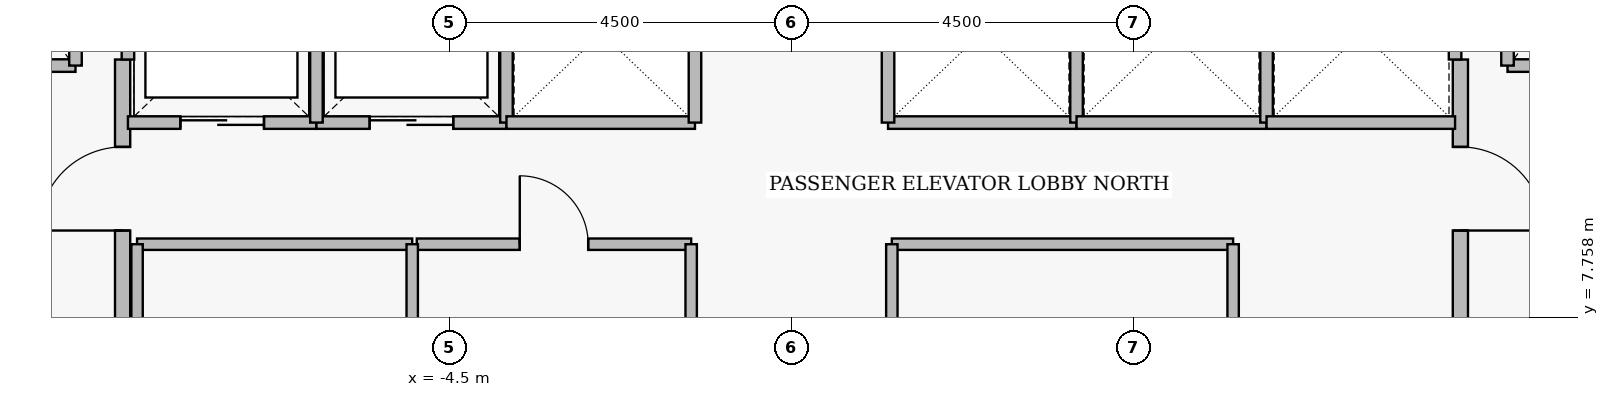
"""IFC4 building model, lengths in metres.
Left out: names, types, materials, properties, quantities, classifications, styles, units other than length and angle.
Written with IfcOpenShell. Run it as: python <this file> out.ifc"""

import sys

from ifc_helpers import new_model, si_unit, direction, frame, frame_2d, origin, place, context, subcontext, project, spatial, rectangle, extrude, element, fill, save


model = new_model("IFC4")
c1 = context("Model", 3, precision=1e-05, world=origin(), true_north=direction((0.0, 1.0)))
c2 = subcontext(c1, "Body", "Model", "MODEL_VIEW")
j1 = project(units=[si_unit("LENGTHUNIT", "METRE"), si_unit("PLANEANGLEUNIT", "RADIAN")], contexts=[c1])
p1 = place(None, origin())
s1 = spatial("IfcSite", under=j1, at=p1, CompositionType="ELEMENT")
p2 = place(p1, origin())
s2 = spatial("IfcBuilding", under=s1, at=p2, CompositionType="ELEMENT")
p3 = place(p2, frame((0.0, 0.0, 139.45)))
s3 = spatial("IfcBuildingStorey", under=s2, at=p3, CompositionType="ELEMENT", Elevation=139.45)
p4 = place(p3, frame((-8.8, 5.05, 0.0), z_axis=(0.0, 0.0, 1.0), x_axis=(0.0, 1.0, 0.0)))
e1 = element("IfcWall", 1, at=p4, inside=s3, PredefinedType="PARTITIONING", context=c2, shape_type="SweptSolid", body=[
    extrude(rectangle(XDim=6.1, YDim=0.2, at=frame_2d((3.05, 0.0))), origin(), (0.0, 0.0, 1.0), 3.43),
])
p5 = place(p4, frame((0.25, 0.0, 0.0)))
e2 = element("IfcOpeningElement", 2, at=p5, cuts=e1, PredefinedType="OPENING", context=c2, shape_type="SweptSolid", body=[
    extrude(rectangle(XDim=1.1, YDim=2.2, at=frame_2d((0.55, 1.1))), frame((0.0, 0.11, 0.0), z_axis=(0.0, -1.0, 0.0), x_axis=(1.0, 0.0, 0.0)), (0.0, 0.0, 1.0), 0.22),
])
p6 = place(p4, frame((3.85, 0.0, 0.0)))
e3 = element("IfcOpeningElement", 3, at=p6, cuts=e1, PredefinedType="OPENING", context=c2, shape_type="SweptSolid", body=[
    extrude(rectangle(XDim=1.1, YDim=2.2, at=frame_2d((0.55, 1.1))), frame((0.0, 0.11, 0.0), z_axis=(0.0, -1.0, 0.0), x_axis=(1.0, 0.0, 0.0)), (0.0, 0.0, 1.0), 0.22),
])
p7 = place(p3, frame((8.8, 11.15, 0.0), z_axis=(0.0, 0.0, 1.0), x_axis=(0.0, -1.0, 0.0)))
e4 = element("IfcWall", 4, at=p7, inside=s3, PredefinedType="PARTITIONING", context=c2, shape_type="SweptSolid", body=[
    extrude(rectangle(XDim=6.1, YDim=0.2, at=frame_2d((3.05, 0.0))), origin(), (0.0, 0.0, 1.0), 3.43),
])
p8 = place(p7, frame((1.15, 0.0, 0.0)))
e5 = element("IfcOpeningElement", 5, at=p8, cuts=e4, PredefinedType="OPENING", context=c2, shape_type="SweptSolid", body=[
    extrude(rectangle(XDim=1.1, YDim=2.2, at=frame_2d((0.55, 1.1))), frame((0.0, 0.11, 0.0), z_axis=(0.0, -1.0, 0.0), x_axis=(1.0, 0.0, 0.0)), (0.0, 0.0, 1.0), 0.22),
])
p9 = place(p7, frame((4.75, 0.0, 0.0)))
e6 = element("IfcOpeningElement", 6, at=p9, cuts=e4, PredefinedType="OPENING", context=c2, shape_type="SweptSolid", body=[
    extrude(rectangle(XDim=1.1, YDim=2.2, at=frame_2d((0.55, 1.1))), frame((0.0, 0.11, 0.0), z_axis=(0.0, -1.0, 0.0), x_axis=(1.0, 0.0, 0.0)), (0.0, 0.0, 1.0), 0.22),
])
p10 = place(p3, frame((-11.58, 11.07, 0.0), z_axis=(0.0, 0.0, 1.0), x_axis=(1.0, 0.0, 0.0)))
e7 = element("IfcWall", 7, at=p10, inside=s3, PredefinedType="PARTITIONING", context=c2, shape_type="SweptSolid", body=[
    extrude(rectangle(XDim=2.16, YDim=0.165, at=frame_2d((1.08, 0.0))), origin(), (0.0, 0.0, 1.0), 3.43),
])
p11 = place(p10, frame((0.53, 0.0, 0.0)))
e8 = element("IfcOpeningElement", 8, at=p11, cuts=e7, PredefinedType="OPENING", context=c2, shape_type="SweptSolid", body=[
    extrude(rectangle(XDim=1.15, YDim=2.25, at=frame_2d((0.575, 1.125))), frame((0.0, 0.093, 0.0), z_axis=(0.0, -1.0, 0.0), x_axis=(1.0, 0.0, 0.0)), (0.0, 0.0, 1.0), 0.185),
])
p12 = place(p3, frame((9.42, 11.07, 0.0), z_axis=(0.0, 0.0, 1.0), x_axis=(1.0, 0.0, 0.0)))
e9 = element("IfcWall", 9, at=p12, inside=s3, PredefinedType="PARTITIONING", context=c2, shape_type="SweptSolid", body=[
    extrude(rectangle(XDim=2.16, YDim=0.165, at=frame_2d((1.08, 0.0))), origin(), (0.0, 0.0, 1.0), 3.43),
])
p13 = place(p12, frame((0.53, 0.0, 0.0)))
e10 = element("IfcOpeningElement", 10, at=p13, cuts=e9, PredefinedType="OPENING", context=c2, shape_type="SweptSolid", body=[
    extrude(rectangle(XDim=1.15, YDim=2.25, at=frame_2d((0.575, 1.125))), frame((0.0, 0.093, 0.0), z_axis=(0.0, -1.0, 0.0), x_axis=(1.0, 0.0, 0.0)), (0.0, 0.0, 1.0), 0.185),
])
p14 = place(p3, frame((-8.73, 10.32, 0.0), z_axis=(0.0, 0.0, 1.0), x_axis=(1.0, 0.0, 0.0)))
e11 = element("IfcWall", 11, at=p14, inside=s3, PredefinedType="PARTITIONING", context=c2, shape_type="SweptSolid", body=[
    extrude(rectangle(XDim=2.48, YDim=0.165, at=frame_2d((1.24, 0.0))), origin(), (0.0, 0.0, 1.0), 3.43),
])
p15 = place(p14, frame((0.69, 0.0, 0.0)))
e12 = element("IfcOpeningElement", 12, at=p15, cuts=e11, PredefinedType="OPENING", context=c2, shape_type="SweptSolid", body=[
    extrude(rectangle(XDim=1.1, YDim=2.25, at=frame_2d((0.55, 1.125))), frame((0.0, 0.093, 0.0), z_axis=(0.0, -1.0, 0.0), x_axis=(1.0, 0.0, 0.0)), (0.0, 0.0, 1.0), 0.185),
])
p16 = place(p3, frame((-6.25, 10.32, 0.0), z_axis=(0.0, 0.0, 1.0), x_axis=(1.0, 0.0, 0.0)))
e13 = element("IfcWall", 13, at=p16, inside=s3, PredefinedType="PARTITIONING", context=c2, shape_type="SweptSolid", body=[
    extrude(rectangle(XDim=2.5, YDim=0.165, at=frame_2d((1.25, 0.0))), origin(), (0.0, 0.0, 1.0), 3.43),
])
p17 = place(p16, frame((0.7, 0.0, 0.0)))
e14 = element("IfcOpeningElement", 14, at=p17, cuts=e13, PredefinedType="OPENING", context=c2, shape_type="SweptSolid", body=[
    extrude(rectangle(XDim=1.1, YDim=2.25, at=frame_2d((0.55, 1.125))), frame((0.0, 0.093, 0.0), z_axis=(0.0, -1.0, 0.0), x_axis=(1.0, 0.0, 0.0)), (0.0, 0.0, 1.0), 0.185),
])
p18 = place(p3, frame((-4.93, 8.72, 0.0), z_axis=(0.0, 0.0, 1.0), x_axis=(1.0, 0.0, 0.0)))
e15 = element("IfcWall", 15, at=p18, inside=s3, PredefinedType="PARTITIONING", context=c2, shape_type="SweptSolid", body=[
    extrude(rectangle(XDim=3.61, YDim=0.15, at=frame_2d((1.805, 0.0))), origin(), (0.0, 0.0, 1.0), 3.43),
])
p19 = place(p18, frame((1.355, 0.0, 0.0)))
e16 = element("IfcOpeningElement", 16, at=p19, cuts=e15, PredefinedType="OPENING", context=c2, shape_type="SweptSolid", body=[
    extrude(rectangle(XDim=0.9, YDim=2.15, at=frame_2d((0.45, 1.075))), frame((0.0, 0.085, 0.0), z_axis=(0.0, -1.0, 0.0), x_axis=(1.0, 0.0, 0.0)), (0.0, 0.0, 1.0), 0.17),
])
for number, where, z_axis, x_axis in (
    (17, (-9.42, 11.07, 0.0), (0.0, 0.0, 1.0), (0.0, 1.0, 0.0)),
    (18, (9.42, 11.07, 0.0), (0.0, 0.0, 1.0), (0.0, 1.0, 0.0)),
):
    element("IfcWall", number, at=place(p3, frame(where, z_axis=z_axis, x_axis=x_axis)), inside=s3, PredefinedType="PARTITIONING", context=c2, shape_type="SweptSolid", body=[
        extrude(rectangle(XDim=2.96, YDim=0.165, at=frame_2d((1.48, 0.0))), origin(), (0.0, 0.0, 1.0), 3.43),
    ])
p20 = place(p3, frame((-8.73, 11.15, 0.0), z_axis=(0.0, 0.0, 1.0), x_axis=(0.0, 1.0, 0.0)))
e19 = element("IfcWall", 19, at=p20, inside=s3, PredefinedType="PARTITIONING", context=c2, shape_type="SweptSolid", body=[
    extrude(rectangle(XDim=1.53, YDim=0.165, at=frame_2d((0.765, 0.0))), origin(), (0.0, 0.0, 1.0), 3.43),
])
for number, where, z_axis, x_axis in (
    (20, (-6.25, 10.32, 0.0), (0.0, 0.0, 1.0), (0.0, 1.0, 0.0)),
    (21, (-3.75, 10.32, 0.0), (0.0, 0.0, 1.0), (0.0, 1.0, 0.0)),
):
    element("IfcWall", number, at=place(p3, frame(where, z_axis=z_axis, x_axis=x_axis)), inside=s3, PredefinedType="PARTITIONING", context=c2, shape_type="SweptSolid", body=[
        extrude(rectangle(XDim=2.36, YDim=0.165, at=frame_2d((1.18, 0.0))), origin(), (0.0, 0.0, 1.0), 3.43),
    ])
p21 = place(p3, frame((-3.75, 10.32, 0.0), z_axis=(0.0, 0.0, 1.0), x_axis=(1.0, 0.0, 0.0)))
e22 = element("IfcWall", 22, at=p21, inside=s3, PredefinedType="PARTITIONING", context=c2, shape_type="SweptSolid", body=[
    extrude(rectangle(XDim=2.48, YDim=0.165, at=frame_2d((1.24, 0.0))), origin(), (0.0, 0.0, 1.0), 3.43),
])
p22 = place(p3, frame((-1.27, 10.32, 0.0), z_axis=(0.0, 0.0, 1.0), x_axis=(0.0, 1.0, 0.0)))
e23 = element("IfcWall", 23, at=p22, inside=s3, PredefinedType="PARTITIONING", context=c2, shape_type="SweptSolid", body=[
    extrude(rectangle(XDim=2.36, YDim=0.165, at=frame_2d((1.18, 0.0))), origin(), (0.0, 0.0, 1.0), 3.43),
])
p23 = place(p3, frame((1.27, 10.32, 0.0), z_axis=(0.0, 0.0, 1.0), x_axis=(1.0, 0.0, 0.0)))
e24 = element("IfcWall", 24, at=p23, inside=s3, PredefinedType="PARTITIONING", context=c2, shape_type="SweptSolid", body=[
    extrude(rectangle(XDim=2.48, YDim=0.165, at=frame_2d((1.24, 0.0))), origin(), (0.0, 0.0, 1.0), 3.43),
])
for number, where, z_axis, x_axis in (
    (25, (1.27, 10.32, 0.0), (0.0, 0.0, 1.0), (0.0, 1.0, 0.0)),
    (26, (3.75, 10.32, 0.0), (0.0, 0.0, 1.0), (0.0, 1.0, 0.0)),
):
    element("IfcWall", number, at=place(p3, frame(where, z_axis=z_axis, x_axis=x_axis)), inside=s3, PredefinedType="PARTITIONING", context=c2, shape_type="SweptSolid", body=[
        extrude(rectangle(XDim=2.36, YDim=0.165, at=frame_2d((1.18, 0.0))), origin(), (0.0, 0.0, 1.0), 3.43),
    ])
p24 = place(p3, frame((3.75, 10.32, 0.0), z_axis=(0.0, 0.0, 1.0), x_axis=(1.0, 0.0, 0.0)))
e27 = element("IfcWall", 27, at=p24, inside=s3, PredefinedType="PARTITIONING", context=c2, shape_type="SweptSolid", body=[
    extrude(rectangle(XDim=2.5, YDim=0.165, at=frame_2d((1.25, 0.0))), origin(), (0.0, 0.0, 1.0), 3.43),
])
p25 = place(p3, frame((6.25, 10.32, 0.0), z_axis=(0.0, 0.0, 1.0), x_axis=(0.0, 1.0, 0.0)))
e28 = element("IfcWall", 28, at=p25, inside=s3, PredefinedType="PARTITIONING", context=c2, shape_type="SweptSolid", body=[
    extrude(rectangle(XDim=2.36, YDim=0.165, at=frame_2d((1.18, 0.0))), origin(), (0.0, 0.0, 1.0), 3.43),
])
p26 = place(p3, frame((6.25, 10.32, 0.0), z_axis=(0.0, 0.0, 1.0), x_axis=(1.0, 0.0, 0.0)))
e29 = element("IfcWall", 29, at=p26, inside=s3, PredefinedType="PARTITIONING", context=c2, shape_type="SweptSolid", body=[
    extrude(rectangle(XDim=2.48, YDim=0.165, at=frame_2d((1.24, 0.0))), origin(), (0.0, 0.0, 1.0), 3.43),
])
p27 = place(p3, frame((8.73, 11.15, 0.0), z_axis=(0.0, 0.0, 1.0), x_axis=(0.0, 1.0, 0.0)))
e30 = element("IfcWall", 30, at=p27, inside=s3, PredefinedType="PARTITIONING", context=c2, shape_type="SweptSolid", body=[
    extrude(rectangle(XDim=1.53, YDim=0.165, at=frame_2d((0.765, 0.0))), origin(), (0.0, 0.0, 1.0), 3.43),
])
p28 = place(p3, frame((-8.61, 8.72, 0.0), z_axis=(0.0, 0.0, 1.0), x_axis=(1.0, 0.0, 0.0)))
e31 = element("IfcWall", 31, at=p28, inside=s3, PredefinedType="PARTITIONING", context=c2, shape_type="SweptSolid", body=[
    extrude(rectangle(XDim=3.62, YDim=0.15, at=frame_2d((1.81, 0.0))), origin(), (0.0, 0.0, 1.0), 3.43),
])
for number, where, z_axis, x_axis in (
    (32, (-8.61, 6.48, 0.0), (0.0, 0.0, 1.0), (0.0, 1.0, 0.0)),
    (33, (-4.99, 6.48, 0.0), (0.0, 0.0, 1.0), (0.0, 1.0, 0.0)),
    (34, (-1.32, 6.48, 0.0), (0.0, 0.0, 1.0), (0.0, 1.0, 0.0)),
):
    element("IfcWall", number, at=place(p3, frame(where, z_axis=z_axis, x_axis=x_axis)), inside=s3, PredefinedType="PARTITIONING", context=c2, shape_type="SweptSolid", body=[
        extrude(rectangle(XDim=2.24, YDim=0.15, at=frame_2d((1.12, 0.0))), origin(), (0.0, 0.0, 1.0), 3.43),
    ])
p29 = place(p3, frame((1.32, 8.72, 0.0), z_axis=(0.0, 0.0, 1.0), x_axis=(1.0, 0.0, 0.0)))
e35 = element("IfcWall", 35, at=p29, inside=s3, PredefinedType="PARTITIONING", context=c2, shape_type="SweptSolid", body=[
    extrude(rectangle(XDim=4.49, YDim=0.15, at=frame_2d((2.245, 0.0))), origin(), (0.0, 0.0, 1.0), 3.43),
])
for number, where, z_axis, x_axis in (
    (36, (1.32, 6.48, 0.0), (0.0, 0.0, 1.0), (0.0, 1.0, 0.0)),
    (37, (5.81, 6.48, 0.0), (0.0, 0.0, 1.0), (0.0, 1.0, 0.0)),
):
    element("IfcWall", number, at=place(p3, frame(where, z_axis=z_axis, x_axis=x_axis)), inside=s3, PredefinedType="PARTITIONING", context=c2, shape_type="SweptSolid", body=[
        extrude(rectangle(XDim=2.24, YDim=0.15, at=frame_2d((1.12, 0.0))), origin(), (0.0, 0.0, 1.0), 3.43),
    ])
p30 = place(p6, origin())
e38 = element("IfcDoor", 38, at=p30, inside=s3, OperationType="SINGLE_SWING_LEFT", PredefinedType="DOOR", context=c2, shape_type="SweptSolid", body=[
    extrude(rectangle(XDim=1.1, YDim=2.2, at=frame_2d((0.55, 1.1))), frame((0.0, 0.025, 0.0), z_axis=(0.0, -1.0, 0.0), x_axis=(1.0, 0.0, 0.0)), (0.0, 0.0, 1.0), 0.05),
])
fill(e3, e38)
p31 = place(p8, origin())
e39 = element("IfcDoor", 39, at=p31, inside=s3, OperationType="SINGLE_SWING_RIGHT", PredefinedType="DOOR", context=c2, shape_type="SweptSolid", body=[
    extrude(rectangle(XDim=1.1, YDim=2.2, at=frame_2d((0.55, 1.1))), frame((0.0, 0.025, 0.0), z_axis=(0.0, -1.0, 0.0), x_axis=(1.0, 0.0, 0.0)), (0.0, 0.0, 1.0), 0.05),
])
fill(e5, e39)
p32 = place(p15, origin())
e40 = element("IfcDoor", 40, at=p32, inside=s3, OperationType="SLIDING_TO_LEFT", PredefinedType="DOOR", context=c2, shape_type="SweptSolid", body=[
    extrude(rectangle(XDim=1.1, YDim=2.25, at=frame_2d((0.55, 1.125))), frame((0.0, 0.025, 0.0), z_axis=(0.0, -1.0, 0.0), x_axis=(1.0, 0.0, 0.0)), (0.0, 0.0, 1.0), 0.05),
])
fill(e12, e40)
p33 = place(p17, origin())
e41 = element("IfcDoor", 41, at=p33, inside=s3, OperationType="SLIDING_TO_LEFT", PredefinedType="DOOR", context=c2, shape_type="SweptSolid", body=[
    extrude(rectangle(XDim=1.1, YDim=2.25, at=frame_2d((0.55, 1.125))), frame((0.0, 0.025, 0.0), z_axis=(0.0, -1.0, 0.0), x_axis=(1.0, 0.0, 0.0)), (0.0, 0.0, 1.0), 0.05),
])
fill(e14, e41)
p34 = place(p19, origin())
e42 = element("IfcDoor", 42, at=p34, inside=s3, OperationType="SINGLE_SWING_LEFT", PredefinedType="DOOR", context=c2, shape_type="SweptSolid", body=[
    extrude(rectangle(XDim=0.9, YDim=2.15, at=frame_2d((0.45, 1.075))), frame((0.0, 0.025, 0.0), z_axis=(0.0, -1.0, 0.0), x_axis=(1.0, 0.0, 0.0)), (0.0, 0.0, 1.0), 0.05),
])
fill(e16, e42)
save(model, sys.argv[1])
